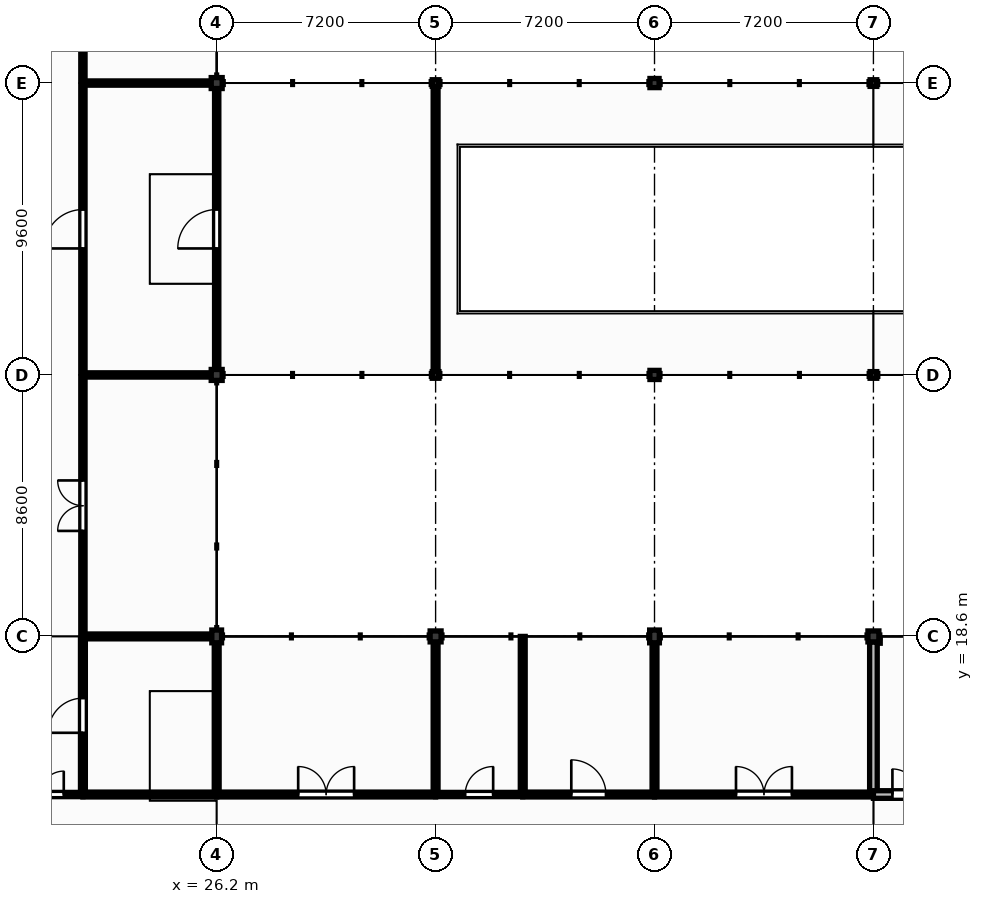
"""IFC4 building model, lengths in metres.
Left out: names, types, materials, properties, quantities, classifications, styles, units other than length and angle.
Written with IfcOpenShell. Run it as: python <this file> out.ifc"""

import sys

from ifc_helpers import new_model, si_unit, direction, frame, frame_2d, origin, origin_2d, place, context, subcontext, project, spatial, rectangle, hollow_circle, i_section, extrude, element, fill, save


model = new_model("IFC4")
c1 = context("Model", 3, precision=1e-05, world=origin(), true_north=direction((0.0, 1.0)))
c2 = subcontext(c1, "Body", "Model", "MODEL_VIEW")
j1 = project(units=[si_unit("LENGTHUNIT", "METRE"), si_unit("PLANEANGLEUNIT", "RADIAN")], contexts=[c1])
p1 = place(None, origin())
s1 = spatial("IfcSite", under=j1, at=p1, CompositionType="ELEMENT")
p2 = place(p1, origin())
s2 = spatial("IfcBuilding", under=s1, at=p2, CompositionType="ELEMENT")
p3 = place(p2, frame((0.0, 0.0, 4.5)))
s3 = spatial("IfcBuildingStorey", under=s2, at=p3, CompositionType="ELEMENT", Elevation=4.5)
p4 = place(p3, frame((26.2, 18.6, 0.0), z_axis=(0.0, 0.0, 1.0), x_axis=(1.0, 0.0, 0.0)))
e1 = element("IfcColumn", 1, at=p4, inside=s3, PredefinedType="COLUMN", context=c2, shape_type="SweptSolid", body=[
    extrude(rectangle(XDim=0.32, YDim=0.42, at=origin_2d()), origin(), (0.0, 0.0, 1.0), 4.26),
])
for number, where, z_axis, x_axis in (
    (2, (26.2, 27.2, 0.0), (0.0, 0.0, 1.0), (1.0, 0.0, 0.0)),
    (3, (26.2, 36.8, 0.0), (0.0, 0.0, 1.0), (1.0, 0.0, 0.0)),
    (4, (33.4, 18.6, 0.0), (0.0, 0.0, 1.0), (1.0, 0.0, 0.0)),
):
    element("IfcColumn", number, at=place(p3, frame(where, z_axis=z_axis, x_axis=x_axis)), inside=s3, PredefinedType="COLUMN", context=c2, shape_type="SweptSolid", body=[
        extrude(rectangle(XDim=0.36, YDim=0.36, at=origin_2d()), origin(), (0.0, 0.0, 1.0), 4.26),
    ])
for number, where, z_axis, x_axis in (
    (5, (33.4, 27.2, 0.0), (0.0, 0.0, 1.0), (1.0, 0.0, 0.0)),
    (6, (33.4, 36.8, 0.0), (0.0, 0.0, 1.0), (1.0, 0.0, 0.0)),
):
    element("IfcColumn", number, at=place(p3, frame(where, z_axis=z_axis, x_axis=x_axis)), inside=s3, PredefinedType="COLUMN", context=c2, shape_type="SweptSolid", body=[
        extrude(hollow_circle(Radius=0.11, WallThickness=0.01, at=origin_2d()), origin(), (0.0, 0.0, 1.0), 4.3),
    ])
p5 = place(p3, frame((40.6, 18.6, 0.0), z_axis=(0.0, 0.0, 1.0), x_axis=(1.0, 0.0, 0.0)))
e7 = element("IfcColumn", 7, at=p5, inside=s3, PredefinedType="COLUMN", context=c2, shape_type="SweptSolid", body=[
    extrude(rectangle(XDim=0.32, YDim=0.42, at=origin_2d()), origin(), (0.0, 0.0, 1.0), 4.26),
])
for number, where, z_axis, x_axis in (
    (8, (40.6, 27.2, 0.0), (0.0, 0.0, 1.0), (1.0, 0.0, 0.0)),
    (9, (40.6, 36.8, 0.0), (0.0, 0.0, 1.0), (1.0, 0.0, 0.0)),
):
    element("IfcColumn", number, at=place(p3, frame(where, z_axis=z_axis, x_axis=x_axis)), inside=s3, PredefinedType="COLUMN", context=c2, shape_type="SweptSolid", body=[
        extrude(i_section(OverallWidth=0.3, OverallDepth=0.3, WebThickness=0.011, FlangeThickness=0.019, FilletRadius=0.027, at=origin_2d()), origin(), (0.0, 0.0, 1.0), 4.3),
    ])
p6 = place(p3, frame((47.8, 18.6, 0.0), z_axis=(0.0, 0.0, 1.0), x_axis=(1.0, 0.0, 0.0)))
e10 = element("IfcColumn", 10, at=p6, inside=s3, PredefinedType="COLUMN", context=c2, shape_type="SweptSolid", body=[
    extrude(rectangle(XDim=0.36, YDim=0.36, at=origin_2d()), origin(), (0.0, 0.0, 1.0), 4.26),
])
for number, where, z_axis, x_axis in (
    (11, (47.8, 27.2, 0.0), (0.0, 0.0, 1.0), (1.0, 0.0, 0.0)),
    (12, (47.8, 36.8, 0.0), (0.0, 0.0, 1.0), (1.0, 0.0, 0.0)),
):
    element("IfcColumn", number, at=place(p3, frame(where, z_axis=z_axis, x_axis=x_axis)), inside=s3, PredefinedType="COLUMN", context=c2, shape_type="SweptSolid", body=[
        extrude(hollow_circle(Radius=0.11, WallThickness=0.01, at=origin_2d()), origin(), (0.0, 0.0, 1.0), 4.3),
    ])
p7 = place(p3, frame((19.0, 13.4, 0.0), z_axis=(0.0, 0.0, 1.0), x_axis=(1.0, 0.0, 0.0)))
e13 = element("IfcWall", 13, at=p7, inside=s3, PredefinedType="PARTITIONING", context=c2, shape_type="SweptSolid", body=[
    extrude(rectangle(XDim=2.8, YDim=0.14, at=frame_2d((1.4, 0.0))), origin(), (0.0, 0.0, 1.0), 4.18),
])
p8 = place(p7, frame((0.63, 0.0, 0.0)))
e14 = element("IfcOpeningElement", 14, at=p8, cuts=e13, PredefinedType="OPENING", context=c2, shape_type="SweptSolid", body=[
    extrude(rectangle(XDim=1.54, YDim=2.25, at=frame_2d((0.77, 1.125))), frame((0.0, 0.08, 0.0), z_axis=(0.0, -1.0, 0.0), x_axis=(1.0, 0.0, 0.0)), (0.0, 0.0, 1.0), 0.16),
])
p9 = place(p3, frame((21.8, 13.47, 0.0), z_axis=(0.0, 0.0, 1.0), x_axis=(0.0, 1.0, 0.0)))
e15 = element("IfcWall", 15, at=p9, inside=s3, PredefinedType="PARTITIONING", context=c2, shape_type="SweptSolid", body=[
    extrude(rectangle(XDim=5.06, YDim=0.16, at=frame_2d((2.53, 0.0))), origin(), (0.0, 0.0, 1.0), 4.18),
])
p10 = place(p9, frame((1.96, 0.0, 0.0)))
e16 = element("IfcOpeningElement", 16, at=p10, cuts=e15, PredefinedType="OPENING", context=c2, shape_type="SweptSolid", body=[
    extrude(rectangle(XDim=1.14, YDim=2.15, at=frame_2d((0.57, 1.075))), frame((0.0, 0.09, 0.0), z_axis=(0.0, -1.0, 0.0), x_axis=(1.0, 0.0, 0.0)), (0.0, 0.0, 1.0), 0.18),
])
p11 = place(p3, frame((21.8, 13.4, 0.0), z_axis=(0.0, 0.0, 1.0), x_axis=(1.0, 0.0, 0.0)))
e17 = element("IfcWall", 17, at=p11, inside=s3, PredefinedType="PARTITIONING", context=c2, shape_type="SweptSolid", body=[
    extrude(rectangle(XDim=4.4, YDim=0.16, at=frame_2d((2.2, 0.0))), origin(), (0.0, 0.0, 1.0), 4.18),
])
p12 = place(p3, frame((21.8, 18.67, 0.0), z_axis=(0.0, 0.0, 1.0), x_axis=(0.0, 1.0, 0.0)))
e18 = element("IfcWall", 18, at=p12, inside=s3, PredefinedType="PARTITIONING", context=c2, shape_type="SweptSolid", body=[
    extrude(rectangle(XDim=8.46, YDim=0.14, at=frame_2d((4.23, 0.0))), origin(), (0.0, 0.0, 1.0), 4.18),
])
p13 = place(p12, frame((3.4, 0.0, 0.0)))
e19 = element("IfcOpeningElement", 19, at=p13, cuts=e18, PredefinedType="OPENING", context=c2, shape_type="SweptSolid", body=[
    extrude(rectangle(XDim=1.66, YDim=2.3, at=frame_2d((0.83, 1.15))), frame((0.0, 0.08, 0.0), z_axis=(0.0, -1.0, 0.0), x_axis=(1.0, 0.0, 0.0)), (0.0, 0.0, 1.0), 0.16),
])
p14 = place(p3, frame((21.8, 18.6, 0.0), z_axis=(0.0, 0.0, 1.0), x_axis=(1.0, 0.0, 0.0)))
e20 = element("IfcWall", 20, at=p14, inside=s3, PredefinedType="PARTITIONING", context=c2, shape_type="SweptSolid", body=[
    extrude(rectangle(XDim=4.24, YDim=0.16, at=frame_2d((2.12, 0.0))), origin(), (0.0, 0.0, 1.0), 3.62),
])
p15 = place(p3, frame((21.8, 27.27, 0.0), z_axis=(0.0, 0.0, 1.0), x_axis=(0.0, 1.0, 0.0)))
e21 = element("IfcWall", 21, at=p15, inside=s3, PredefinedType="PARTITIONING", context=c2, shape_type="SweptSolid", body=[
    extrude(rectangle(XDim=9.46, YDim=0.14, at=frame_2d((4.73, 0.0))), origin(), (0.0, 0.0, 1.0), 4.18),
])
p16 = place(p15, frame((4.09, 0.0, 0.0)))
e22 = element("IfcOpeningElement", 22, at=p16, cuts=e21, PredefinedType="OPENING", context=c2, shape_type="SweptSolid", body=[
    extrude(rectangle(XDim=1.28, YDim=2.2, at=frame_2d((0.64, 1.1))), frame((0.0, 0.08, 0.0), z_axis=(0.0, -1.0, 0.0), x_axis=(1.0, 0.0, 0.0)), (0.0, 0.0, 1.0), 0.16),
])
p17 = place(p3, frame((21.8, 27.2, 0.0), z_axis=(0.0, 0.0, 1.0), x_axis=(1.0, 0.0, 0.0)))
e23 = element("IfcWall", 23, at=p17, inside=s3, PredefinedType="PARTITIONING", context=c2, shape_type="SweptSolid", body=[
    extrude(rectangle(XDim=4.22, YDim=0.14, at=frame_2d((2.11, 0.0))), origin(), (0.0, 0.0, 1.0), 3.66),
])
p18 = place(p3, frame((21.8, 36.87, 0.0), z_axis=(0.0, 0.0, 1.0), x_axis=(0.0, 1.0, 0.0)))
e24 = element("IfcWall", 24, at=p18, inside=s3, PredefinedType="PARTITIONING", context=c2, shape_type="SweptSolid", body=[
    extrude(rectangle(XDim=8.46, YDim=0.14, at=frame_2d((4.23, 0.0))), origin(), (0.0, 0.0, 1.0), 4.18),
])
p19 = place(p18, frame((3.74, 0.0, 0.0)))
e25 = element("IfcOpeningElement", 25, at=p19, cuts=e24, PredefinedType="OPENING", context=c2, shape_type="SweptSolid", body=[
    extrude(rectangle(XDim=0.98, YDim=2.15, at=frame_2d((0.49, 1.075))), frame((0.0, 0.08, 0.0), z_axis=(0.0, -1.0, 0.0), x_axis=(1.0, 0.0, 0.0)), (0.0, 0.0, 1.0), 0.16),
])
p20 = place(p3, frame((21.8, 36.8, 0.0), z_axis=(0.0, 0.0, 1.0), x_axis=(1.0, 0.0, 0.0)))
e26 = element("IfcWall", 26, at=p20, inside=s3, PredefinedType="PARTITIONING", context=c2, shape_type="SweptSolid", body=[
    extrude(rectangle(XDim=4.22, YDim=0.14, at=frame_2d((2.11, 0.0))), origin(), (0.0, 0.0, 1.0), 3.62),
])
p21 = place(p3, frame((26.2, 13.47, 0.0), z_axis=(0.0, 0.0, 1.0), x_axis=(0.0, 1.0, 0.0)))
e27 = element("IfcWall", 27, at=p21, inside=s3, PredefinedType="PARTITIONING", context=c2, shape_type="SweptSolid", body=[
    extrude(rectangle(XDim=4.92, YDim=0.16, at=frame_2d((2.46, 0.0))), origin(), (0.0, 0.0, 1.0), 3.74),
])
p22 = place(p3, frame((26.2, 13.4, 0.0), z_axis=(0.0, 0.0, 1.0), x_axis=(1.0, 0.0, 0.0)))
e28 = element("IfcWall", 28, at=p22, inside=s3, PredefinedType="PARTITIONING", context=c2, shape_type="SweptSolid", body=[
    extrude(rectangle(XDim=7.2, YDim=0.16, at=frame_2d((3.6, 0.0))), origin(), (0.0, 0.0, 1.0), 4.18),
])
p23 = place(p22, frame((2.68, 0.0, 0.0)))
e29 = element("IfcOpeningElement", 29, at=p23, cuts=e28, PredefinedType="OPENING", context=c2, shape_type="SweptSolid", body=[
    extrude(rectangle(XDim=1.84, YDim=2.35, at=frame_2d((0.92, 1.175))), frame((0.0, 0.09, 0.0), z_axis=(0.0, -1.0, 0.0), x_axis=(1.0, 0.0, 0.0)), (0.0, 0.0, 1.0), 0.18),
])
p24 = place(p3, frame((26.2, 27.38, 0.0), z_axis=(0.0, 0.0, 1.0), x_axis=(0.0, 1.0, 0.0)))
e30 = element("IfcWall", 30, at=p24, inside=s3, PredefinedType="PARTITIONING", context=c2, shape_type="SweptSolid", body=[
    extrude(rectangle(XDim=9.24, YDim=0.14, at=frame_2d((4.62, 0.0))), origin(), (0.0, 0.0, 1.0), 3.97),
])
p25 = place(p24, frame((3.98, 0.0, 0.0)))
e31 = element("IfcOpeningElement", 31, at=p25, cuts=e30, PredefinedType="OPENING", context=c2, shape_type="SweptSolid", body=[
    extrude(rectangle(XDim=1.28, YDim=2.2, at=frame_2d((0.64, 1.1))), frame((0.0, 0.08, 0.0), z_axis=(0.0, -1.0, 0.0), x_axis=(1.0, 0.0, 0.0)), (0.0, 0.0, 1.0), 0.16),
])
p26 = place(p3, frame((33.4, 13.47, 0.0), z_axis=(0.0, 0.0, 1.0), x_axis=(0.0, 1.0, 0.0)))
e32 = element("IfcWall", 32, at=p26, inside=s3, PredefinedType="PARTITIONING", context=c2, shape_type="SweptSolid", body=[
    extrude(rectangle(XDim=4.95, YDim=0.16, at=frame_2d((2.475, 0.0))), origin(), (0.0, 0.0, 1.0), 3.74),
])
p27 = place(p3, frame((33.4, 13.4, 0.0), z_axis=(0.0, 0.0, 1.0), x_axis=(1.0, 0.0, 0.0)))
e33 = element("IfcWall", 33, at=p27, inside=s3, PredefinedType="PARTITIONING", context=c2, shape_type="SweptSolid", body=[
    extrude(rectangle(XDim=2.866, YDim=0.14, at=frame_2d((1.433, 0.0))), origin(), (0.0, 0.0, 1.0), 4.18),
])
p28 = place(p27, frame((0.973, 0.0, 0.0)))
e34 = element("IfcOpeningElement", 34, at=p28, cuts=e33, PredefinedType="OPENING", context=c2, shape_type="SweptSolid", body=[
    extrude(rectangle(XDim=0.92, YDim=2.1, at=frame_2d((0.46, 1.05))), frame((0.0, 0.08, 0.0), z_axis=(0.0, -1.0, 0.0), x_axis=(1.0, 0.0, 0.0)), (0.0, 0.0, 1.0), 0.16),
])
p29 = place(p3, frame((36.266, 13.47, 0.0), z_axis=(0.0, 0.0, 1.0), x_axis=(0.0, 1.0, 0.0)))
e35 = element("IfcWall", 35, at=p29, inside=s3, PredefinedType="PARTITIONING", context=c2, shape_type="SweptSolid", body=[
    extrude(rectangle(XDim=5.13, YDim=0.16, at=frame_2d((2.565, 0.0))), origin(), (0.0, 0.0, 1.0), 4.18),
])
p30 = place(p3, frame((36.266, 13.4, 0.0), z_axis=(0.0, 0.0, 1.0), x_axis=(1.0, 0.0, 0.0)))
e36 = element("IfcWall", 36, at=p30, inside=s3, PredefinedType="PARTITIONING", context=c2, shape_type="SweptSolid", body=[
    extrude(rectangle(XDim=4.334, YDim=0.16, at=frame_2d((2.167, 0.0))), origin(), (0.0, 0.0, 1.0), 4.18),
])
p31 = place(p30, frame((1.597, 0.0, 0.0)))
e37 = element("IfcOpeningElement", 37, at=p31, cuts=e36, PredefinedType="OPENING", context=c2, shape_type="SweptSolid", body=[
    extrude(rectangle(XDim=1.14, YDim=2.15, at=frame_2d((0.57, 1.075))), frame((0.0, 0.09, 0.0), z_axis=(0.0, -1.0, 0.0), x_axis=(1.0, 0.0, 0.0)), (0.0, 0.0, 1.0), 0.18),
])
p32 = place(p3, frame((40.6, 13.47, 0.0), z_axis=(0.0, 0.0, 1.0), x_axis=(0.0, 1.0, 0.0)))
e38 = element("IfcWall", 38, at=p32, inside=s3, PredefinedType="PARTITIONING", context=c2, shape_type="SweptSolid", body=[
    extrude(rectangle(XDim=4.92, YDim=0.16, at=frame_2d((2.46, 0.0))), origin(), (0.0, 0.0, 1.0), 3.74),
])
p33 = place(p3, frame((40.6, 13.4, 0.0), z_axis=(0.0, 0.0, 1.0), x_axis=(1.0, 0.0, 0.0)))
e39 = element("IfcWall", 39, at=p33, inside=s3, PredefinedType="PARTITIONING", context=c2, shape_type="SweptSolid", body=[
    extrude(rectangle(XDim=7.2, YDim=0.16, at=frame_2d((3.6, 0.0))), origin(), (0.0, 0.0, 1.0), 4.18),
])
p34 = place(p33, frame((2.68, 0.0, 0.0)))
e40 = element("IfcOpeningElement", 40, at=p34, cuts=e39, PredefinedType="OPENING", context=c2, shape_type="SweptSolid", body=[
    extrude(rectangle(XDim=1.84, YDim=2.35, at=frame_2d((0.92, 1.175))), frame((0.0, 0.09, 0.0), z_axis=(0.0, -1.0, 0.0), x_axis=(1.0, 0.0, 0.0)), (0.0, 0.0, 1.0), 0.18),
])
p35 = place(p3, frame((47.8, 13.47, 0.0), z_axis=(0.0, 0.0, 1.0), x_axis=(0.0, 1.0, 0.0)))
e41 = element("IfcWall", 41, at=p35, inside=s3, PredefinedType="SOLIDWALL", context=c2, shape_type="SweptSolid", body=[
    extrude(rectangle(XDim=4.95, YDim=0.25, at=frame_2d((2.475, 0.0))), origin(), (0.0, 0.0, 1.0), 3.74),
])
p36 = place(p3, frame((47.8, 13.4, 0.0), z_axis=(0.0, 0.0, 1.0), x_axis=(1.0, 0.0, 0.0)))
e42 = element("IfcWall", 42, at=p36, inside=s3, PredefinedType="SOLIDWALL", context=c2, shape_type="SweptSolid", body=[
    extrude(rectangle(XDim=2.93, YDim=0.25, at=frame_2d((1.465, 0.0))), origin(), (0.0, 0.0, 1.0), 4.18),
])
p37 = place(p36, frame((0.625, 0.0, 0.0)))
e43 = element("IfcOpeningElement", 43, at=p37, cuts=e42, PredefinedType="OPENING", context=c2, shape_type="SweptSolid", body=[
    extrude(rectangle(XDim=1.68, YDim=2.3, at=frame_2d((0.84, 1.15))), frame((0.0, 0.135, 0.0), z_axis=(0.0, -1.0, 0.0), x_axis=(1.0, 0.0, 0.0)), (0.0, 0.0, 1.0), 0.27),
])
p38 = place(p3, frame((33.4, 27.31, 0.0), z_axis=(0.0, 0.0, 1.0), x_axis=(0.0, 1.0, 0.0)))
e44 = element("IfcWall", 44, at=p38, inside=s3, PredefinedType="PARTITIONING", context=c2, shape_type="SweptSolid", body=[
    extrude(rectangle(XDim=9.381, YDim=0.16, at=frame_2d((4.69, 0.0))), origin(), (0.0, 0.0, 1.0), 4.18),
])
p39 = place(p8, origin())
e45 = element("IfcDoor", 45, at=p39, inside=s3, OperationType="DOUBLE_DOOR_SINGLE_SWING", PredefinedType="DOOR", context=c2, shape_type="SweptSolid", body=[
    extrude(rectangle(XDim=1.54, YDim=2.25, at=frame_2d((0.77, 1.125))), frame((0.0, 0.025, 0.0), z_axis=(0.0, -1.0, 0.0), x_axis=(1.0, 0.0, 0.0)), (0.0, 0.0, 1.0), 0.05),
])
fill(e14, e45)
p40 = place(p16, origin())
e46 = element("IfcDoor", 46, at=p40, inside=s3, OperationType="SINGLE_SWING_LEFT", PredefinedType="DOOR", context=c2, shape_type="SweptSolid", body=[
    extrude(rectangle(XDim=1.28, YDim=2.2, at=frame_2d((0.64, 1.1))), frame((0.0, 0.025, 0.0), z_axis=(0.0, -1.0, 0.0), x_axis=(1.0, 0.0, 0.0)), (0.0, 0.0, 1.0), 0.05),
])
fill(e22, e46)
p41 = place(p25, origin())
e47 = element("IfcDoor", 47, at=p41, inside=s3, OperationType="SINGLE_SWING_LEFT", PredefinedType="DOOR", context=c2, shape_type="SweptSolid", body=[
    extrude(rectangle(XDim=1.28, YDim=2.2, at=frame_2d((0.64, 1.1))), frame((0.0, 0.025, 0.0), z_axis=(0.0, -1.0, 0.0), x_axis=(1.0, 0.0, 0.0)), (0.0, 0.0, 1.0), 0.05),
])
fill(e31, e47)
p42 = place(p13, origin())
e48 = element("IfcDoor", 48, at=p42, inside=s3, OperationType="DOUBLE_DOOR_SINGLE_SWING", PredefinedType="DOOR", context=c2, shape_type="SweptSolid", body=[
    extrude(rectangle(XDim=1.66, YDim=2.3, at=frame_2d((0.83, 1.15))), frame((0.0, 0.025, 0.0), z_axis=(0.0, -1.0, 0.0), x_axis=(1.0, 0.0, 0.0)), (0.0, 0.0, 1.0), 0.05),
])
fill(e19, e48)
p43 = place(p37, origin())
e49 = element("IfcDoor", 49, at=p43, inside=s3, OperationType="DOUBLE_DOOR_SINGLE_SWING", PredefinedType="DOOR", context=c2, shape_type="SweptSolid", body=[
    extrude(rectangle(XDim=1.68, YDim=2.3, at=frame_2d((0.84, 1.15))), frame((0.0, 0.025, 0.0), z_axis=(0.0, -1.0, 0.0), x_axis=(1.0, 0.0, 0.0)), (0.0, 0.0, 1.0), 0.05),
])
fill(e43, e49)
p44 = place(p10, origin())
e50 = element("IfcDoor", 50, at=p44, inside=s3, OperationType="SINGLE_SWING_LEFT", PredefinedType="DOOR", context=c2, shape_type="SweptSolid", body=[
    extrude(rectangle(XDim=1.14, YDim=2.15, at=frame_2d((0.57, 1.075))), frame((0.0, 0.025, 0.0), z_axis=(0.0, -1.0, 0.0), x_axis=(1.0, 0.0, 0.0)), (0.0, 0.0, 1.0), 0.05),
])
fill(e16, e50)
p45 = place(p23, origin())
e51 = element("IfcDoor", 51, at=p45, inside=s3, OperationType="DOUBLE_DOOR_SINGLE_SWING", PredefinedType="DOOR", context=c2, shape_type="SweptSolid", body=[
    extrude(rectangle(XDim=1.84, YDim=2.35, at=frame_2d((0.92, 1.175))), frame((0.0, 0.025, 0.0), z_axis=(0.0, -1.0, 0.0), x_axis=(1.0, 0.0, 0.0)), (0.0, 0.0, 1.0), 0.05),
])
fill(e29, e51)
p46 = place(p28, origin())
e52 = element("IfcDoor", 52, at=p46, inside=s3, OperationType="SINGLE_SWING_RIGHT", PredefinedType="DOOR", context=c2, shape_type="SweptSolid", body=[
    extrude(rectangle(XDim=0.92, YDim=2.1, at=frame_2d((0.46, 1.05))), frame((0.0, 0.025, 0.0), z_axis=(0.0, -1.0, 0.0), x_axis=(1.0, 0.0, 0.0)), (0.0, 0.0, 1.0), 0.05),
])
fill(e34, e52)
p47 = place(p31, origin())
e53 = element("IfcDoor", 53, at=p47, inside=s3, OperationType="SINGLE_SWING_LEFT", PredefinedType="DOOR", context=c2, shape_type="SweptSolid", body=[
    extrude(rectangle(XDim=1.14, YDim=2.15, at=frame_2d((0.57, 1.075))), frame((0.0, 0.025, 0.0), z_axis=(0.0, -1.0, 0.0), x_axis=(1.0, 0.0, 0.0)), (0.0, 0.0, 1.0), 0.05),
])
fill(e37, e53)
p48 = place(p34, origin())
e54 = element("IfcDoor", 54, at=p48, inside=s3, OperationType="DOUBLE_DOOR_SINGLE_SWING", PredefinedType="DOOR", context=c2, shape_type="SweptSolid", body=[
    extrude(rectangle(XDim=1.84, YDim=2.35, at=frame_2d((0.92, 1.175))), frame((0.0, 0.025, 0.0), z_axis=(0.0, -1.0, 0.0), x_axis=(1.0, 0.0, 0.0)), (0.0, 0.0, 1.0), 0.05),
])
fill(e40, e54)
save(model, sys.argv[1])
